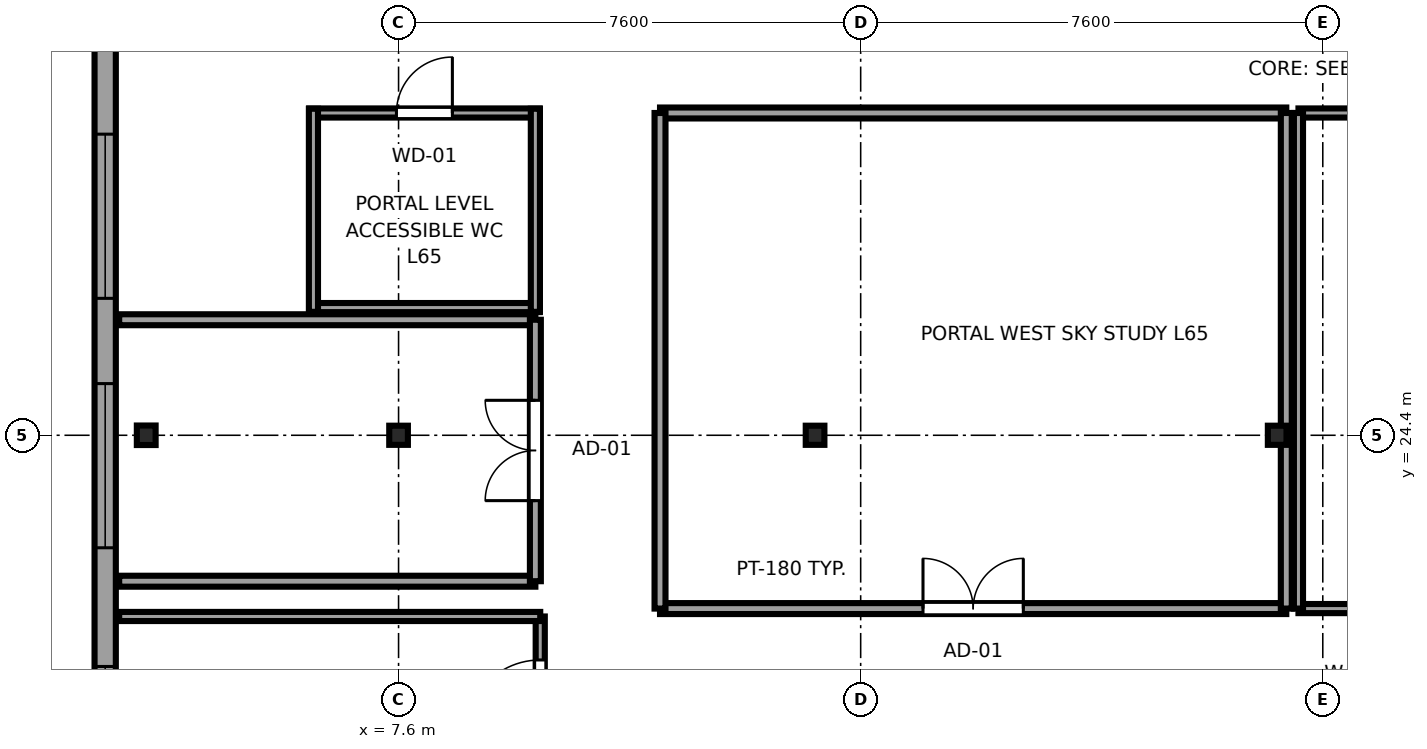
"""IFC4 building model, lengths in metres.
Left out: names, types, materials, properties, quantities, classifications, styles, units other than length and angle.
Written with IfcOpenShell. Run it as: python <this file> out.ifc"""

import sys

from ifc_helpers import new_model, si_unit, direction, frame, frame_2d, origin, origin_2d, place, context, subcontext, project, spatial, rectangle, i_section, extrude, source, transform, mapped, element, fill, save


model = new_model("IFC4")
c1 = context("Model", 3, precision=1e-05, world=origin(), true_north=direction((0.0, 1.0)))
c2 = subcontext(c1, "Body", "Model", "MODEL_VIEW")
j1 = project(units=[si_unit("LENGTHUNIT", "METRE"), si_unit("PLANEANGLEUNIT", "RADIAN")], contexts=[c1])
p1 = place(None, origin())
s1 = spatial("IfcSite", under=j1, at=p1, CompositionType="ELEMENT")
p2 = place(p1, origin())
s2 = spatial("IfcBuilding", under=s1, at=p2, CompositionType="ELEMENT")
p3 = place(p2, frame((0.0, 0.0, 245.2)))
s3 = spatial("IfcBuildingStorey", under=s2, at=p3, CompositionType="ELEMENT", Elevation=245.2)
m1 = source(origin(), c2, "Body", "SweptSolid", [
    extrude(i_section(OverallWidth=0.309, OverallDepth=0.321, WebThickness=0.014, FlangeThickness=0.022, FilletRadius=0.017, at=origin_2d()), origin(), (0.0, 0.0, 1.0), 3.55),
])
p4 = place(p3, frame((3.45, 24.4, 0.0), z_axis=(0.0, 0.0, 1.0), x_axis=(1.0, 0.0, 0.0)))
e1 = element("IfcColumn", 1, at=p4, inside=s3, PredefinedType="COLUMN", context=c2, shape_type="MappedRepresentation", body=[
    mapped(m1, transform((0.0, 0.0, 0.0), x_axis=(1.0, 0.0, 0.0), y_axis=(0.0, 1.0, 0.0), z_axis=(0.0, 0.0, 1.0), scale=1.0)),
])
m2 = source(origin(), c2, "Body", "SweptSolid", [
    extrude(i_section(OverallWidth=0.307, OverallDepth=0.315, WebThickness=0.012, FlangeThickness=0.019, FilletRadius=0.017, at=origin_2d()), origin(), (0.0, 0.0, 1.0), 3.55),
])
for number, where, z_axis, x_axis in (
    (2, (7.6, 24.4, 0.0), (0.0, 0.0, 1.0), (1.0, 0.0, 0.0)),
    (3, (14.45, 24.4, 0.0), (0.0, 0.0, 1.0), (1.0, 0.0, 0.0)),
    (4, (22.05, 24.4, 0.0), (0.0, 0.0, 1.0), (1.0, 0.0, 0.0)),
):
    element("IfcColumn", number, at=place(p3, frame(where, z_axis=z_axis, x_axis=x_axis)), inside=s3, PredefinedType="COLUMN", context=c2, shape_type="MappedRepresentation", body=[
        mapped(m2, transform((0.0, 0.0, 0.0), x_axis=(1.0, 0.0, 0.0), y_axis=(0.0, 1.0, 0.0), z_axis=(0.0, 0.0, 1.0), scale=1.0)),
    ])
p5 = place(p3, frame((2.775, 40.783, 0.0), z_axis=(0.0, 0.0, 1.0), x_axis=(0.0, -1.0, 0.0)))
e5 = element("IfcWall", 5, at=p5, inside=s3, PredefinedType="SOLIDWALL", context=c2, shape_type="SweptSolid", body=[
    extrude(rectangle(XDim=33.766, YDim=0.35, at=frame_2d((16.883, 0.0))), origin(), (0.0, 0.0, 1.0), 3.37),
])
p6 = place(p5, frame((1.576, 0.0, 0.68)))
e6 = element("IfcOpeningElement", 6, at=p6, cuts=e5, PredefinedType="OPENING", context=c2, shape_type="SweptSolid", body=[
    extrude(rectangle(XDim=2.7, YDim=1.95, at=frame_2d((1.35, 0.975))), frame((0.0, 0.185, 0.0), z_axis=(0.0, -1.0, 0.0), x_axis=(1.0, 0.0, 0.0)), (0.0, 0.0, 1.0), 0.37),
])
p7 = place(p5, frame((6.228, 0.0, 0.68)))
e7 = element("IfcOpeningElement", 7, at=p7, cuts=e5, PredefinedType="OPENING", context=c2, shape_type="SweptSolid", body=[
    extrude(rectangle(XDim=2.7, YDim=1.95, at=frame_2d((1.35, 0.975))), frame((0.0, 0.185, 0.0), z_axis=(0.0, -1.0, 0.0), x_axis=(1.0, 0.0, 0.0)), (0.0, 0.0, 1.0), 0.37),
])
p8 = place(p5, frame((11.431, 0.0, 0.68)))
e8 = element("IfcOpeningElement", 8, at=p8, cuts=e5, PredefinedType="OPENING", context=c2, shape_type="SweptSolid", body=[
    extrude(rectangle(XDim=2.7, YDim=1.95, at=frame_2d((1.35, 0.975))), frame((0.0, 0.185, 0.0), z_axis=(0.0, -1.0, 0.0), x_axis=(1.0, 0.0, 0.0)), (0.0, 0.0, 1.0), 0.37),
])
p9 = place(p5, frame((15.533, 0.0, 0.68)))
e9 = element("IfcOpeningElement", 9, at=p9, cuts=e5, PredefinedType="OPENING", context=c2, shape_type="SweptSolid", body=[
    extrude(rectangle(XDim=2.7, YDim=1.95, at=frame_2d((1.35, 0.975))), frame((0.0, 0.185, 0.0), z_axis=(0.0, -1.0, 0.0), x_axis=(1.0, 0.0, 0.0)), (0.0, 0.0, 1.0), 0.37),
])
p10 = place(p5, frame((20.185, 0.0, 0.68)))
e10 = element("IfcOpeningElement", 10, at=p10, cuts=e5, PredefinedType="OPENING", context=c2, shape_type="SweptSolid", body=[
    extrude(rectangle(XDim=2.7, YDim=1.95, at=frame_2d((1.35, 0.975))), frame((0.0, 0.185, 0.0), z_axis=(0.0, -1.0, 0.0), x_axis=(1.0, 0.0, 0.0)), (0.0, 0.0, 1.0), 0.37),
])
p11 = place(p5, frame((24.837, 0.0, 0.68)))
e11 = element("IfcOpeningElement", 11, at=p11, cuts=e5, PredefinedType="OPENING", context=c2, shape_type="SweptSolid", body=[
    extrude(rectangle(XDim=2.7, YDim=1.95, at=frame_2d((1.35, 0.975))), frame((0.0, 0.185, 0.0), z_axis=(0.0, -1.0, 0.0), x_axis=(1.0, 0.0, 0.0)), (0.0, 0.0, 1.0), 0.37),
])
p12 = place(p5, frame((29.489, 0.0, 0.68)))
e12 = element("IfcOpeningElement", 12, at=p12, cuts=e5, PredefinedType="OPENING", context=c2, shape_type="SweptSolid", body=[
    extrude(rectangle(XDim=2.7, YDim=1.95, at=frame_2d((1.35, 0.975))), frame((0.0, 0.185, 0.0), z_axis=(0.0, -1.0, 0.0), x_axis=(1.0, 0.0, 0.0)), (0.0, 0.0, 1.0), 0.37),
])
p13 = place(p3, frame((9.93, 18.81, 0.0), z_axis=(0.0, 0.0, 1.0), x_axis=(0.0, 1.0, 0.0)))
e13 = element("IfcWall", 13, at=p13, inside=s3, PredefinedType="PARTITIONING", context=c2, shape_type="SweptSolid", body=[
    extrude(rectangle(XDim=2.61, YDim=0.15, at=frame_2d((1.305, 0.0))), origin(), (0.0, 0.0, 1.0), 3.37),
])
p14 = place(p13, frame((0.675, 0.0, 0.0)))
e14 = element("IfcOpeningElement", 14, at=p14, cuts=e13, PredefinedType="OPENING", context=c2, shape_type="SweptSolid", body=[
    extrude(rectangle(XDim=1.22, YDim=2.08, at=frame_2d((0.61, 1.04))), frame((0.0, 0.085, 0.0), z_axis=(0.0, -1.0, 0.0), x_axis=(1.0, 0.0, 0.0)), (0.0, 0.0, 1.0), 0.17),
])
p15 = place(p3, frame((3.005, 21.42, 0.0), z_axis=(0.0, 0.0, 1.0), x_axis=(1.0, 0.0, 0.0)))
e15 = element("IfcWall", 15, at=p15, inside=s3, PredefinedType="PARTITIONING", context=c2, shape_type="SweptSolid", body=[
    extrude(rectangle(XDim=6.925, YDim=0.15, at=frame_2d((3.462, 0.0))), origin(), (0.0, 0.0, 1.0), 3.37),
])
p16 = place(p3, frame((11.9, 21.55, 0.0), z_axis=(0.0, 0.0, 1.0), x_axis=(1.0, 0.0, 0.0)))
e16 = element("IfcWall", 16, at=p16, inside=s3, PredefinedType="PARTITIONING", context=c2, shape_type="SweptSolid", body=[
    extrude(rectangle(XDim=10.3, YDim=0.18, at=frame_2d((5.15, 0.0))), origin(), (0.0, 0.0, 1.0), 3.37),
])
p17 = place(p16, frame((4.325, 0.0, 0.0)))
e17 = element("IfcOpeningElement", 17, at=p17, cuts=e16, PredefinedType="OPENING", context=c2, shape_type="SweptSolid", body=[
    extrude(rectangle(XDim=1.65, YDim=2.15, at=frame_2d((0.825, 1.075))), frame((0.0, 0.1, 0.0), z_axis=(0.0, -1.0, 0.0), x_axis=(1.0, 0.0, 0.0)), (0.0, 0.0, 1.0), 0.2),
])
p18 = place(p3, frame((11.9, 29.7, 0.0), z_axis=(0.0, 0.0, 1.0), x_axis=(1.0, 0.0, 0.0)))
e18 = element("IfcWall", 18, at=p18, inside=s3, PredefinedType="PARTITIONING", context=c2, shape_type="SweptSolid", body=[
    extrude(rectangle(XDim=10.3, YDim=0.18, at=frame_2d((5.15, 0.0))), origin(), (0.0, 0.0, 1.0), 3.37),
])
p19 = place(p3, frame((11.9, 21.55, 0.0), z_axis=(0.0, 0.0, 1.0), x_axis=(0.0, 1.0, 0.0)))
e19 = element("IfcWall", 19, at=p19, inside=s3, PredefinedType="PARTITIONING", context=c2, shape_type="SweptSolid", body=[
    extrude(rectangle(XDim=8.15, YDim=0.18, at=frame_2d((4.075, 0.0))), origin(), (0.0, 0.0, 1.0), 3.37),
])
p20 = place(p3, frame((22.2, 21.55, 0.0), z_axis=(0.0, 0.0, 1.0), x_axis=(0.0, 1.0, 0.0)))
e20 = element("IfcWall", 20, at=p20, inside=s3, PredefinedType="PARTITIONING", context=c2, shape_type="SweptSolid", body=[
    extrude(rectangle(XDim=8.15, YDim=0.18, at=frame_2d((4.075, 0.0))), origin(), (0.0, 0.0, 1.0), 2.827),
])
p21 = place(p3, frame((22.4, 21.55, 0.0), z_axis=(0.0, 0.0, 1.0), x_axis=(1.0, 0.0, 0.0)))
e21 = element("IfcWall", 21, at=p21, inside=s3, PredefinedType="PARTITIONING", context=c2, shape_type="SweptSolid", body=[
    extrude(rectangle(XDim=10.4, YDim=0.15, at=frame_2d((5.2, 0.0))), origin(), (0.0, 0.0, 1.0), 3.37),
])
p22 = place(p21, frame((4.075, 0.0, 0.0)))
e22 = element("IfcOpeningElement", 22, at=p22, cuts=e21, PredefinedType="OPENING", context=c2, shape_type="SweptSolid", body=[
    extrude(rectangle(XDim=1.65, YDim=2.15, at=frame_2d((0.825, 1.075))), frame((0.0, 0.085, 0.0), z_axis=(0.0, -1.0, 0.0), x_axis=(1.0, 0.0, 0.0)), (0.0, 0.0, 1.0), 0.17),
])
p23 = place(p3, frame((22.4, 29.7, 0.0), z_axis=(0.0, 0.0, 1.0), x_axis=(1.0, 0.0, 0.0)))
e23 = element("IfcWall", 23, at=p23, inside=s3, PredefinedType="PARTITIONING", context=c2, shape_type="SweptSolid", body=[
    extrude(rectangle(XDim=10.4, YDim=0.15, at=frame_2d((5.2, 0.0))), origin(), (0.0, 0.0, 1.0), 3.37),
])
p24 = place(p3, frame((22.4, 21.55, 0.0), z_axis=(0.0, 0.0, 1.0), x_axis=(0.0, 1.0, 0.0)))
e24 = element("IfcWall", 24, at=p24, inside=s3, PredefinedType="PARTITIONING", context=c2, shape_type="SweptSolid", body=[
    extrude(rectangle(XDim=8.15, YDim=0.15, at=frame_2d((4.075, 0.0))), origin(), (0.0, 0.0, 1.0), 3.37),
])
for number, where, z_axis, x_axis in (
    (25, (3.005, 22.0, 0.0), (0.0, 0.0, 1.0), (1.0, 0.0, 0.0)),
    (26, (3.005, 26.3, 0.0), (0.0, 0.0, 1.0), (1.0, 0.0, 0.0)),
):
    element("IfcWall", number, at=place(p3, frame(where, z_axis=z_axis, x_axis=x_axis)), inside=s3, PredefinedType="PARTITIONING", context=c2, shape_type="SweptSolid", body=[
        extrude(rectangle(XDim=6.845, YDim=0.18, at=frame_2d((3.423, 0.0))), origin(), (0.0, 0.0, 1.0), 3.37),
    ])
p25 = place(p3, frame((9.85, 22.0, 0.0), z_axis=(0.0, 0.0, 1.0), x_axis=(0.0, 1.0, 0.0)))
e27 = element("IfcWall", 27, at=p25, inside=s3, PredefinedType="PARTITIONING", context=c2, shape_type="SweptSolid", body=[
    extrude(rectangle(XDim=4.3, YDim=0.18, at=frame_2d((2.15, 0.0))), origin(), (0.0, 0.0, 1.0), 3.37),
])
p26 = place(p25, frame((1.325, 0.0, 0.0)))
e28 = element("IfcOpeningElement", 28, at=p26, cuts=e27, PredefinedType="OPENING", context=c2, shape_type="SweptSolid", body=[
    extrude(rectangle(XDim=1.65, YDim=2.15, at=frame_2d((0.825, 1.075))), frame((0.0, 0.1, 0.0), z_axis=(0.0, -1.0, 0.0), x_axis=(1.0, 0.0, 0.0)), (0.0, 0.0, 1.0), 0.2),
])
p27 = place(p3, frame((6.13, 26.5, 0.0), z_axis=(0.0, 0.0, 1.0), x_axis=(1.0, 0.0, 0.0)))
e29 = element("IfcWall", 29, at=p27, inside=s3, PredefinedType="PARTITIONING", context=c2, shape_type="SweptSolid", body=[
    extrude(rectangle(XDim=3.79, YDim=0.15, at=frame_2d((1.895, 0.0))), origin(), (0.0, 0.0, 1.0), 3.37),
])
p28 = place(p3, frame((6.13, 29.7, 0.0), z_axis=(0.0, 0.0, 1.0), x_axis=(1.0, 0.0, 0.0)))
e30 = element("IfcWall", 30, at=p28, inside=s3, PredefinedType="PARTITIONING", context=c2, shape_type="SweptSolid", body=[
    extrude(rectangle(XDim=3.79, YDim=0.15, at=frame_2d((1.895, 0.0))), origin(), (0.0, 0.0, 1.0), 3.37),
])
p29 = place(p28, frame((1.435, 0.0, 0.0)))
e31 = element("IfcOpeningElement", 31, at=p29, cuts=e30, PredefinedType="OPENING", context=c2, shape_type="SweptSolid", body=[
    extrude(rectangle(XDim=0.92, YDim=2.01, at=frame_2d((0.46, 1.005))), frame((0.0, 0.085, 0.0), z_axis=(0.0, -1.0, 0.0), x_axis=(1.0, 0.0, 0.0)), (0.0, 0.0, 1.0), 0.17),
])
for number, where, z_axis, x_axis in (
    (32, (6.2, 26.43, 0.0), (0.0, 0.0, 1.0), (0.0, 1.0, 0.0)),
    (33, (9.85, 26.43, 0.0), (0.0, 0.0, 1.0), (0.0, 1.0, 0.0)),
):
    element("IfcWall", number, at=place(p3, frame(where, z_axis=z_axis, x_axis=x_axis)), inside=s3, PredefinedType="PARTITIONING", context=c2, shape_type="SweptSolid", body=[
        extrude(rectangle(XDim=3.34, YDim=0.15, at=frame_2d((1.67, 0.0))), origin(), (0.0, 0.0, 1.0), 3.37),
    ])
m3 = source(origin(), c2, "Body", "SweptSolid", [
    extrude(rectangle(XDim=2.7, YDim=1.95, at=frame_2d((1.35, 0.975))), frame((0.0, 0.09, 0.0), z_axis=(0.0, -1.0, 0.0), x_axis=(1.0, 0.0, 0.0)), (0.0, 0.0, 1.0), 0.06),
])
p30 = place(p8, origin())
e34 = element("IfcWindow", 34, at=p30, inside=s3, PartitioningType="TRIPLE_PANEL_HORIZONTAL", PredefinedType="WINDOW", context=c2, shape_type="MappedRepresentation", body=[
    mapped(m3, transform((0.0, 0.0, 0.0), x_axis=(1.0, 0.0, 0.0), y_axis=(0.0, 1.0, 0.0), z_axis=(0.0, 0.0, 1.0), scale=1.0)),
])
fill(e8, e34)
p31 = place(p9, origin())
e35 = element("IfcWindow", 35, at=p31, inside=s3, PartitioningType="TRIPLE_PANEL_HORIZONTAL", PredefinedType="WINDOW", context=c2, shape_type="MappedRepresentation", body=[
    mapped(m3, transform((0.0, 0.0, 0.0), x_axis=(1.0, 0.0, 0.0), y_axis=(0.0, 1.0, 0.0), z_axis=(0.0, 0.0, 1.0), scale=1.0)),
])
fill(e9, e35)
p32 = place(p10, origin())
e36 = element("IfcWindow", 36, at=p32, inside=s3, PartitioningType="TRIPLE_PANEL_HORIZONTAL", PredefinedType="WINDOW", context=c2, shape_type="MappedRepresentation", body=[
    mapped(m3, transform((0.0, 0.0, 0.0), x_axis=(1.0, 0.0, 0.0), y_axis=(0.0, 1.0, 0.0), z_axis=(0.0, 0.0, 1.0), scale=1.0)),
])
fill(e10, e36)
m4 = source(origin(), c2, "Body", "SweptSolid", [
    extrude(rectangle(XDim=1.22, YDim=2.08, at=frame_2d((0.61, 1.04))), frame((0.0, 0.025, 0.0), z_axis=(0.0, -1.0, 0.0), x_axis=(1.0, 0.0, 0.0)), (0.0, 0.0, 1.0), 0.05),
])
p33 = place(p14, origin())
e37 = element("IfcDoor", 37, at=p33, inside=s3, OperationType="SINGLE_SWING_LEFT", PredefinedType="DOOR", context=c2, shape_type="MappedRepresentation", body=[
    mapped(m4, transform((0.0, 0.0, 0.0), x_axis=(1.0, 0.0, 0.0), y_axis=(0.0, 1.0, 0.0), z_axis=(0.0, 0.0, 1.0), scale=1.0)),
])
fill(e14, e37)
m5 = source(origin(), c2, "Body", "SweptSolid", [
    extrude(rectangle(XDim=1.65, YDim=2.15, at=frame_2d((0.825, 1.075))), frame((0.0, 0.025, 0.0), z_axis=(0.0, -1.0, 0.0), x_axis=(1.0, 0.0, 0.0)), (0.0, 0.0, 1.0), 0.05),
])
p34 = place(p17, origin())
e38 = element("IfcDoor", 38, at=p34, inside=s3, OperationType="DOUBLE_DOOR_SINGLE_SWING", PredefinedType="DOOR", context=c2, shape_type="MappedRepresentation", body=[
    mapped(m5, transform((0.0, 0.0, 0.0), x_axis=(1.0, 0.0, 0.0), y_axis=(0.0, 1.0, 0.0), z_axis=(0.0, 0.0, 1.0), scale=1.0)),
])
fill(e17, e38)
p35 = place(p26, origin())
e39 = element("IfcDoor", 39, at=p35, inside=s3, OperationType="DOUBLE_DOOR_SINGLE_SWING", PredefinedType="DOOR", context=c2, shape_type="MappedRepresentation", body=[
    mapped(m5, transform((0.0, 0.0, 0.0), x_axis=(1.0, 0.0, 0.0), y_axis=(0.0, 1.0, 0.0), z_axis=(0.0, 0.0, 1.0), scale=1.0)),
])
fill(e28, e39)
m6 = source(origin(), c2, "Body", "SweptSolid", [
    extrude(rectangle(XDim=0.92, YDim=2.01, at=frame_2d((0.46, 1.005))), frame((0.0, 0.025, 0.0), z_axis=(0.0, -1.0, 0.0), x_axis=(1.0, 0.0, 0.0)), (0.0, 0.0, 1.0), 0.05),
])
p36 = place(p29, origin())
e40 = element("IfcDoor", 40, at=p36, inside=s3, OperationType="SINGLE_SWING_RIGHT", PredefinedType="DOOR", context=c2, shape_type="MappedRepresentation", body=[
    mapped(m6, transform((0.0, 0.0, 0.0), x_axis=(1.0, 0.0, 0.0), y_axis=(0.0, 1.0, 0.0), z_axis=(0.0, 0.0, 1.0), scale=1.0)),
])
fill(e31, e40)
save(model, sys.argv[1])
